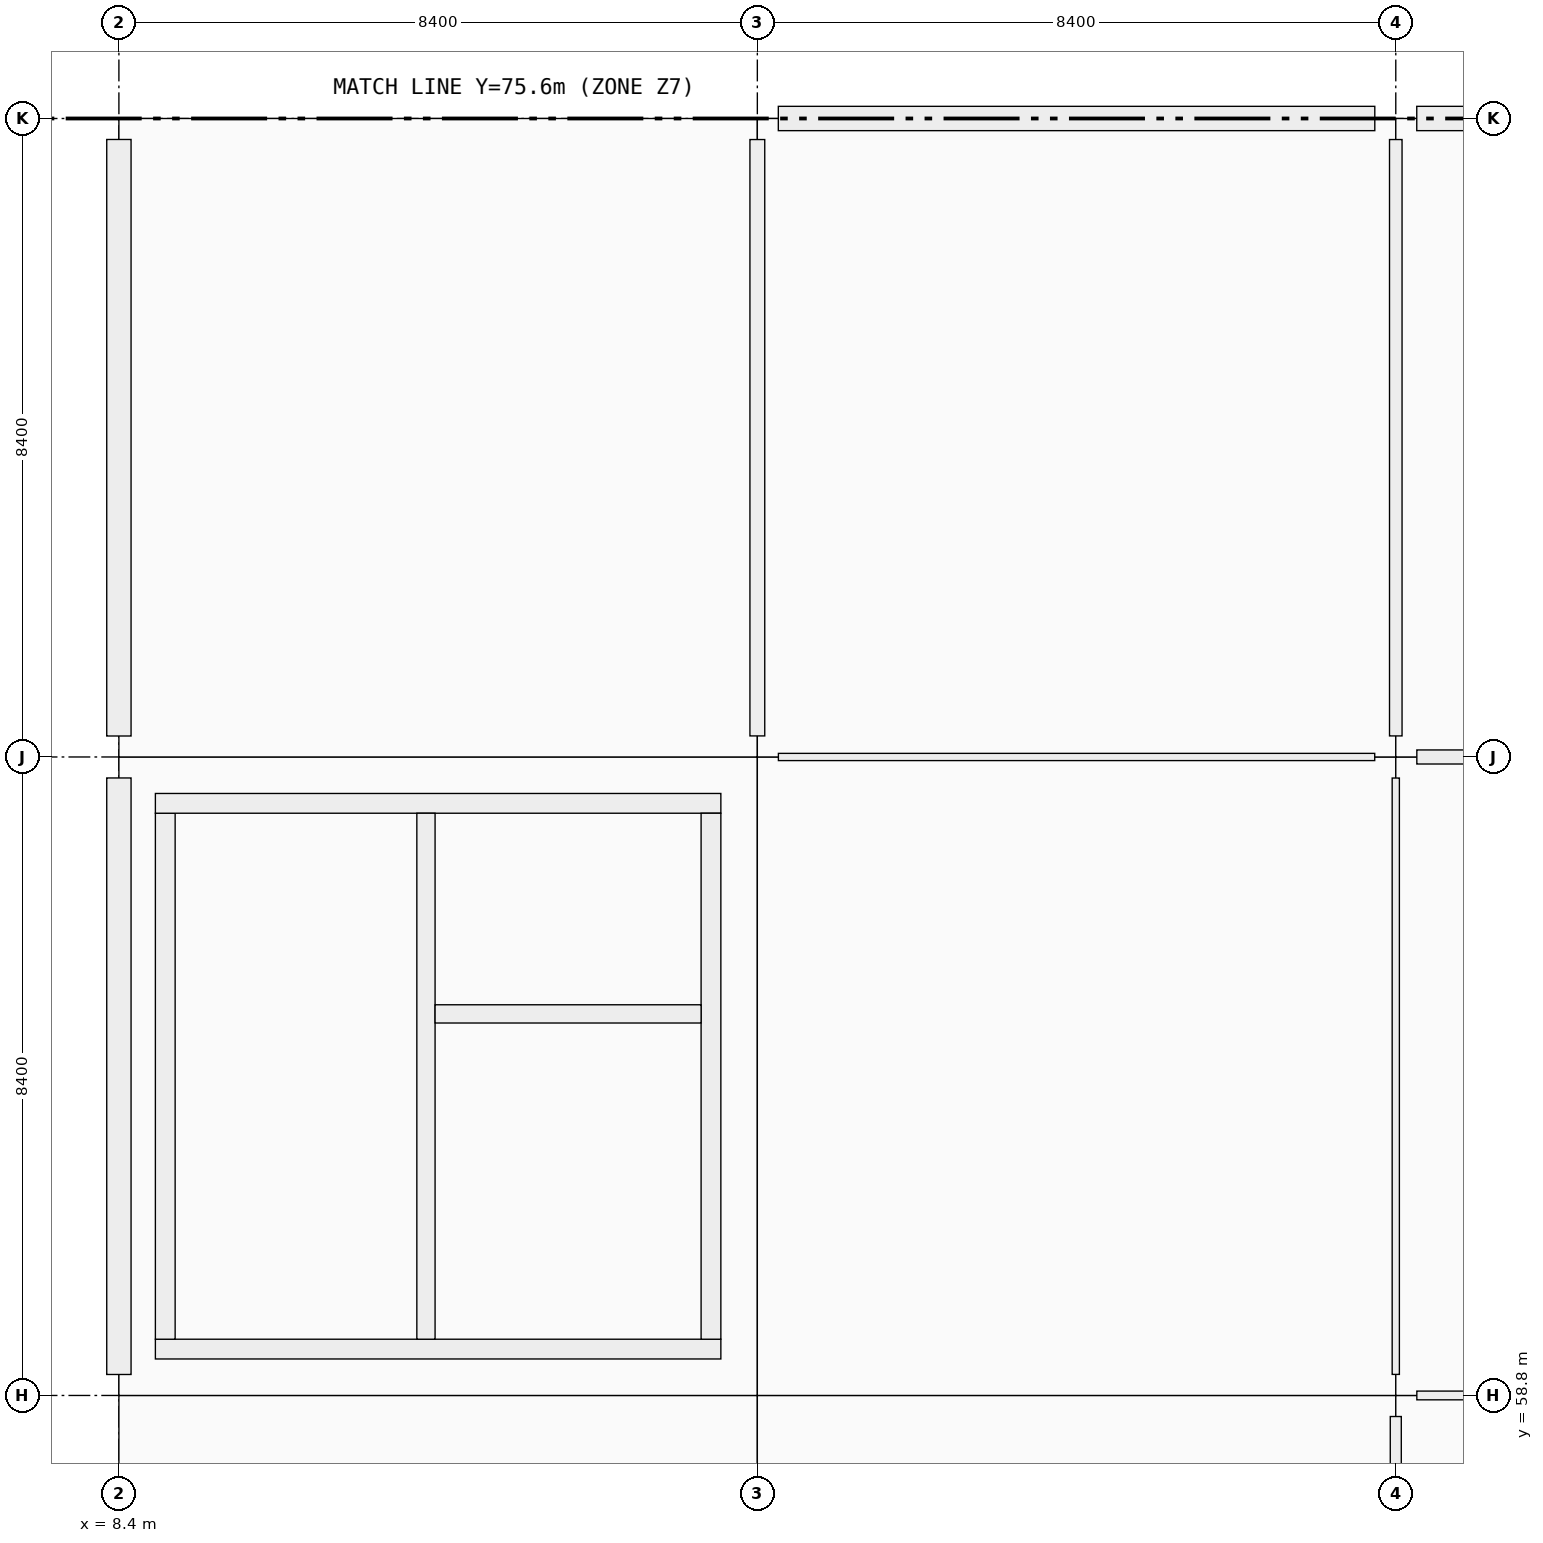
"""IFC4 building model, lengths in metres.
Left out: names, types, materials, properties, quantities, classifications, styles, units other than length and angle.
Written with IfcOpenShell. Run it as: python <this file> out.ifc"""

import sys

from ifc_helpers import new_model, si_unit, direction, frame, frame_2d, origin, origin_2d, place, context, subcontext, project, spatial, rectangle, i_section, extrude, element, fill, save


model = new_model("IFC4")
c1 = context("Model", 3, precision=1e-05, world=origin(), true_north=direction((0.0, 1.0)))
c2 = subcontext(c1, "Body", "Model", "MODEL_VIEW")
j1 = project(units=[si_unit("LENGTHUNIT", "METRE"), si_unit("PLANEANGLEUNIT", "RADIAN")], contexts=[c1])
p1 = place(None, origin())
s1 = spatial("IfcSite", under=j1, at=p1, CompositionType="ELEMENT")
p2 = place(p1, origin())
s2 = spatial("IfcBuilding", under=s1, at=p2, CompositionType="ELEMENT")
p3 = place(p2, frame((0.0, 0.0, 19.08)))
s3 = spatial("IfcBuildingStorey", under=s2, at=p3, CompositionType="ELEMENT", Elevation=19.08)
for number, where, z_axis, x_axis in (
    (1, (8.4, 58.8, 0.0), (0.0, 0.0, 1.0), (1.0, 0.0, 0.0)),
    (2, (8.4, 67.2, 0.0), (0.0, 0.0, 1.0), (1.0, 0.0, 0.0)),
    (3, (8.4, 75.6, 0.0), (0.0, 0.0, 1.0), (1.0, 0.0, 0.0)),
    (4, (16.8, 58.8, 0.0), (0.0, 0.0, 1.0), (1.0, 0.0, 0.0)),
    (5, (16.8, 67.2, 0.0), (0.0, 0.0, 1.0), (1.0, 0.0, 0.0)),
    (6, (16.8, 75.6, 0.0), (0.0, 0.0, 1.0), (1.0, 0.0, 0.0)),
    (7, (25.2, 58.8, 0.0), (0.0, 0.0, 1.0), (1.0, 0.0, 0.0)),
    (8, (25.2, 67.2, 0.0), (0.0, 0.0, 1.0), (1.0, 0.0, 0.0)),
    (9, (25.2, 75.6, 0.0), (0.0, 0.0, 1.0), (1.0, 0.0, 0.0)),
):
    element("IfcColumn", number, at=place(p3, frame(where, z_axis=z_axis, x_axis=x_axis)), inside=s3, PredefinedType="COLUMN", context=c2, shape_type="SweptSolid", body=[
        extrude(rectangle(XDim=0.55, YDim=0.55, at=origin_2d()), origin(), (0.0, 0.0, 1.0), 4.16),
    ])
for number, where, z_axis, x_axis in (
    (10, (16.8, 58.8, 4.16), (0.0, 0.0, 1.0), (1.0, 0.0, 0.0)),
    (11, (25.2, 58.8, 4.16), (0.0, 0.0, 1.0), (1.0, 0.0, 0.0)),
    (12, (16.8, 67.2, 4.16), (0.0, 0.0, 1.0), (1.0, 0.0, 0.0)),
    (13, (25.2, 67.2, 4.16), (0.0, 0.0, 1.0), (1.0, 0.0, 0.0)),
    (14, (16.8, 75.6, 4.16), (0.0, 0.0, 1.0), (1.0, 0.0, 0.0)),
    (15, (25.2, 75.6, 4.16), (0.0, 0.0, 1.0), (1.0, 0.0, 0.0)),
):
    element("IfcColumn", number, at=place(p3, frame(where, z_axis=z_axis, x_axis=x_axis)), inside=s3, PredefinedType="COLUMN", context=c2, shape_type="SweptSolid", body=[
        extrude(i_section(OverallWidth=0.305, OverallDepth=0.308, WebThickness=0.01, FlangeThickness=0.015, FilletRadius=0.017, at=origin_2d()), origin(), (0.0, 0.0, 1.0), 1.925),
    ])
p4 = place(p3, frame((8.4, 59.076, 0.0), z_axis=(0.0, 0.0, 1.0), x_axis=(0.0, 1.0, 0.0)))
e16 = element("IfcWall", 16, at=p4, inside=s3, PredefinedType="SOLIDWALL", context=c2, shape_type="SweptSolid", body=[
    extrude(rectangle(XDim=7.848, YDim=0.32, at=frame_2d((3.924, 0.0))), origin(), (0.0, 0.0, 1.0), 3.37),
])
p5 = place(p3, frame((8.4, 67.476, 0.0), z_axis=(0.0, 0.0, 1.0), x_axis=(0.0, 1.0, 0.0)))
e17 = element("IfcWall", 17, at=p5, inside=s3, PredefinedType="SOLIDWALL", context=c2, shape_type="SweptSolid", body=[
    extrude(rectangle(XDim=7.848, YDim=0.32, at=frame_2d((3.924, 0.0))), origin(), (0.0, 0.0, 1.0), 3.37),
])
p6 = place(p3, frame((17.076, 75.6, 0.0), z_axis=(0.0, 0.0, 1.0), x_axis=(1.0, 0.0, 0.0)))
e18 = element("IfcWall", 18, at=p6, inside=s3, PredefinedType="SOLIDWALL", context=c2, shape_type="SweptSolid", body=[
    extrude(rectangle(XDim=7.848, YDim=0.32, at=frame_2d((3.924, 0.0))), origin(), (0.0, 0.0, 1.0), 3.37),
])
p7 = place(p3, frame((25.476, 75.6, 0.0), z_axis=(0.0, 0.0, 1.0), x_axis=(1.0, 0.0, 0.0)))
e19 = element("IfcWall", 19, at=p7, inside=s3, PredefinedType="SOLIDWALL", context=c2, shape_type="SweptSolid", body=[
    extrude(rectangle(XDim=7.848, YDim=0.32, at=frame_2d((3.924, 0.0))), origin(), (0.0, 0.0, 1.0), 3.37),
])
p8 = place(p7, frame((3.074, 0.0, 0.9)))
e20 = element("IfcOpeningElement", 20, at=p8, cuts=e19, PredefinedType="OPENING", context=c2, shape_type="SweptSolid", body=[
    extrude(rectangle(XDim=1.7, YDim=1.85, at=frame_2d((0.85, 0.925))), frame((0.0, 0.16, 0.0), z_axis=(0.0, -1.0, 0.0), x_axis=(1.0, 0.0, 0.0)), (0.0, 0.0, 1.0), 0.32),
])
p9 = place(p3, frame((16.32, 59.41, 0.0), z_axis=(0.0, 0.0, 1.0), x_axis=(-1.0, 0.0, 0.0)))
e21 = element("IfcWall", 21, at=p9, inside=s3, PredefinedType="SHEAR", context=c2, shape_type="SweptSolid", body=[
    extrude(rectangle(XDim=7.44, YDim=0.26, at=frame_2d((3.72, 0.0))), origin(), (0.0, 0.0, 1.0), 4.07),
])
p10 = place(p9, frame((1.28, 0.0, 0.0)))
e22 = element("IfcOpeningElement", 22, at=p10, cuts=e21, PredefinedType="OPENING", context=c2, shape_type="SweptSolid", body=[
    extrude(rectangle(XDim=1.5, YDim=2.15, at=frame_2d((0.75, 1.075))), frame((0.0, 0.13, 0.0), z_axis=(0.0, -1.0, 0.0), x_axis=(1.0, 0.0, 0.0)), (0.0, 0.0, 1.0), 0.26),
])
p11 = place(p3, frame((9.01, 59.54, 0.0), z_axis=(0.0, 0.0, 1.0), x_axis=(0.0, 1.0, 0.0)))
e23 = element("IfcWall", 23, at=p11, inside=s3, PredefinedType="SHEAR", context=c2, shape_type="SweptSolid", body=[
    extrude(rectangle(XDim=6.92, YDim=0.26, at=frame_2d((3.46, 0.0))), origin(), (0.0, 0.0, 1.0), 4.07),
])
p12 = place(p3, frame((8.88, 66.59, 0.0), z_axis=(0.0, 0.0, 1.0), x_axis=(1.0, 0.0, 0.0)))
e24 = element("IfcWall", 24, at=p12, inside=s3, PredefinedType="SHEAR", context=c2, shape_type="SweptSolid", body=[
    extrude(rectangle(XDim=7.44, YDim=0.26, at=frame_2d((3.72, 0.0))), origin(), (0.0, 0.0, 1.0), 4.07),
])
p13 = place(p3, frame((16.19, 66.46, 0.0), z_axis=(0.0, 0.0, 1.0), x_axis=(0.0, -1.0, 0.0)))
e25 = element("IfcWall", 25, at=p13, inside=s3, PredefinedType="SHEAR", context=c2, shape_type="SweptSolid", body=[
    extrude(rectangle(XDim=6.92, YDim=0.26, at=frame_2d((3.46, 0.0))), origin(), (0.0, 0.0, 1.0), 4.07),
])
p14 = place(p3, frame((12.44, 59.54, 0.0), z_axis=(0.0, 0.0, 1.0), x_axis=(0.0, 1.0, 0.0)))
e26 = element("IfcWall", 26, at=p14, inside=s3, PredefinedType="SHEAR", context=c2, shape_type="SweptSolid", body=[
    extrude(rectangle(XDim=6.92, YDim=0.24, at=frame_2d((3.46, 0.0))), origin(), (0.0, 0.0, 1.0), 4.07),
])
p15 = place(p14, frame((0.12, 0.0, 0.0)))
e27 = element("IfcOpeningElement", 27, at=p15, cuts=e26, PredefinedType="OPENING", context=c2, shape_type="SweptSolid", body=[
    extrude(rectangle(XDim=1.0, YDim=2.15, at=frame_2d((0.5, 1.075))), frame((0.0, 0.12, 0.0), z_axis=(0.0, -1.0, 0.0), x_axis=(1.0, 0.0, 0.0)), (0.0, 0.0, 1.0), 0.24),
])
p16 = place(p3, frame((12.56, 63.82, 0.0), z_axis=(0.0, 0.0, 1.0), x_axis=(1.0, 0.0, 0.0)))
e28 = element("IfcWall", 28, at=p16, inside=s3, PredefinedType="SHEAR", context=c2, shape_type="SweptSolid", body=[
    extrude(rectangle(XDim=3.5, YDim=0.24, at=frame_2d((1.75, 0.0))), origin(), (0.0, 0.0, 1.0), 4.07),
])
p17 = place(p16, frame((1.2, 0.0, 0.0)))
e29 = element("IfcOpeningElement", 29, at=p17, cuts=e28, PredefinedType="OPENING", context=c2, shape_type="SweptSolid", body=[
    extrude(rectangle(XDim=1.1, YDim=2.15, at=frame_2d((0.55, 1.075))), frame((0.0, 0.12, 0.0), z_axis=(0.0, -1.0, 0.0), x_axis=(1.0, 0.0, 0.0)), (0.0, 0.0, 1.0), 0.24),
])
p18 = place(p3, frame((17.077, 67.2, 0.0), z_axis=(0.0, 0.0, 1.0), x_axis=(1.0, 0.0, 0.0)))
e30 = element("IfcWall", 30, at=p18, inside=s3, PredefinedType="PARTITIONING", context=c2, shape_type="SweptSolid", body=[
    extrude(rectangle(XDim=7.846, YDim=0.095, at=frame_2d((3.923, 0.0))), origin(), (0.0, 0.0, 1.0), 3.19),
])
p19 = place(p18, frame((3.458, 0.0, 0.0)))
e31 = element("IfcOpeningElement", 31, at=p19, cuts=e30, PredefinedType="OPENING", context=c2, shape_type="SweptSolid", body=[
    extrude(rectangle(XDim=0.93, YDim=2.12, at=frame_2d((0.465, 1.06))), frame((0.0, 0.047, 0.0), z_axis=(0.0, -1.0, 0.0), x_axis=(1.0, 0.0, 0.0)), (0.0, 0.0, 1.0), 0.095),
])
p20 = place(p3, frame((25.477, 58.8, 0.0), z_axis=(0.0, 0.0, 1.0), x_axis=(1.0, 0.0, 0.0)))
e32 = element("IfcWall", 32, at=p20, inside=s3, PredefinedType="PARTITIONING", context=c2, shape_type="SweptSolid", body=[
    extrude(rectangle(XDim=7.846, YDim=0.115, at=frame_2d((3.923, 0.0))), origin(), (0.0, 0.0, 1.0), 3.19),
])
p21 = place(p20, frame((3.443, 0.0, 0.0)))
e33 = element("IfcOpeningElement", 33, at=p21, cuts=e32, PredefinedType="OPENING", context=c2, shape_type="SweptSolid", body=[
    extrude(rectangle(XDim=0.96, YDim=2.18, at=frame_2d((0.48, 1.09))), frame((0.0, 0.058, 0.0), z_axis=(0.0, -1.0, 0.0), x_axis=(1.0, 0.0, 0.0)), (0.0, 0.0, 1.0), 0.115),
])
p22 = place(p3, frame((25.477, 67.2, 0.0), z_axis=(0.0, 0.0, 1.0), x_axis=(1.0, 0.0, 0.0)))
e34 = element("IfcWall", 34, at=p22, inside=s3, PredefinedType="PARTITIONING", context=c2, shape_type="SweptSolid", body=[
    extrude(rectangle(XDim=7.846, YDim=0.185, at=frame_2d((3.923, 0.0))), origin(), (0.0, 0.0, 1.0), 3.19),
])
p23 = place(p22, frame((3.453, 0.0, 0.0)))
e35 = element("IfcOpeningElement", 35, at=p23, cuts=e34, PredefinedType="OPENING", context=c2, shape_type="SweptSolid", body=[
    extrude(rectangle(XDim=0.94, YDim=2.15, at=frame_2d((0.47, 1.075))), frame((0.0, 0.093, 0.0), z_axis=(0.0, -1.0, 0.0), x_axis=(1.0, 0.0, 0.0)), (0.0, 0.0, 1.0), 0.185),
])
p24 = place(p3, frame((16.8, 67.477, 0.0), z_axis=(0.0, 0.0, 1.0), x_axis=(0.0, 1.0, 0.0)))
e36 = element("IfcWall", 36, at=p24, inside=s3, PredefinedType="PARTITIONING", context=c2, shape_type="SweptSolid", body=[
    extrude(rectangle(XDim=7.846, YDim=0.195, at=frame_2d((3.923, 0.0))), origin(), (0.0, 0.0, 1.0), 3.19),
])
p25 = place(p24, frame((3.403, 0.0, 0.0)))
e37 = element("IfcOpeningElement", 37, at=p25, cuts=e36, PredefinedType="OPENING", context=c2, shape_type="SweptSolid", body=[
    extrude(rectangle(XDim=1.04, YDim=2.2, at=frame_2d((0.52, 1.1))), frame((0.0, 0.098, 0.0), z_axis=(0.0, -1.0, 0.0), x_axis=(1.0, 0.0, 0.0)), (0.0, 0.0, 1.0), 0.195),
])
p26 = place(p3, frame((25.2, 50.677, 0.0), z_axis=(0.0, 0.0, 1.0), x_axis=(0.0, 1.0, 0.0)))
e38 = element("IfcWall", 38, at=p26, inside=s3, PredefinedType="PARTITIONING", context=c2, shape_type="SweptSolid", body=[
    extrude(rectangle(XDim=7.846, YDim=0.145, at=frame_2d((3.923, 0.0))), origin(), (0.0, 0.0, 1.0), 3.19),
])
p27 = place(p26, frame((3.423, 0.0, 0.0)))
e39 = element("IfcOpeningElement", 39, at=p27, cuts=e38, PredefinedType="OPENING", context=c2, shape_type="SweptSolid", body=[
    extrude(rectangle(XDim=1.0, YDim=2.2, at=frame_2d((0.5, 1.1))), frame((0.0, 0.073, 0.0), z_axis=(0.0, -1.0, 0.0), x_axis=(1.0, 0.0, 0.0)), (0.0, 0.0, 1.0), 0.145),
])
p28 = place(p3, frame((25.2, 59.077, 0.0), z_axis=(0.0, 0.0, 1.0), x_axis=(0.0, 1.0, 0.0)))
e40 = element("IfcWall", 40, at=p28, inside=s3, PredefinedType="PARTITIONING", context=c2, shape_type="SweptSolid", body=[
    extrude(rectangle(XDim=7.846, YDim=0.095, at=frame_2d((3.923, 0.0))), origin(), (0.0, 0.0, 1.0), 3.19),
])
p29 = place(p28, frame((3.433, 0.0, 0.0)))
e41 = element("IfcOpeningElement", 41, at=p29, cuts=e40, PredefinedType="OPENING", context=c2, shape_type="SweptSolid", body=[
    extrude(rectangle(XDim=0.98, YDim=2.18, at=frame_2d((0.49, 1.09))), frame((0.0, 0.047, 0.0), z_axis=(0.0, -1.0, 0.0), x_axis=(1.0, 0.0, 0.0)), (0.0, 0.0, 1.0), 0.095),
])
p30 = place(p3, frame((25.2, 67.477, 0.0), z_axis=(0.0, 0.0, 1.0), x_axis=(0.0, 1.0, 0.0)))
e42 = element("IfcWall", 42, at=p30, inside=s3, PredefinedType="PARTITIONING", context=c2, shape_type="SweptSolid", body=[
    extrude(rectangle(XDim=7.846, YDim=0.165, at=frame_2d((3.923, 0.0))), origin(), (0.0, 0.0, 1.0), 3.19),
])
p31 = place(p30, frame((3.438, 0.0, 0.0)))
e43 = element("IfcOpeningElement", 43, at=p31, cuts=e42, PredefinedType="OPENING", context=c2, shape_type="SweptSolid", body=[
    extrude(rectangle(XDim=0.97, YDim=2.12, at=frame_2d((0.485, 1.06))), frame((0.0, 0.083, 0.0), z_axis=(0.0, -1.0, 0.0), x_axis=(1.0, 0.0, 0.0)), (0.0, 0.0, 1.0), 0.165),
])
p32 = place(p15, origin())
e44 = element("IfcDoor", 44, at=p32, inside=s3, OperationType="SINGLE_SWING_LEFT", PredefinedType="DOOR", context=c2, shape_type="SweptSolid", body=[
    extrude(rectangle(XDim=1.0, YDim=2.15, at=frame_2d((0.5, 1.075))), frame((0.0, 0.025, 0.0), z_axis=(0.0, -1.0, 0.0), x_axis=(1.0, 0.0, 0.0)), (0.0, 0.0, 1.0), 0.05),
])
fill(e27, e44)
p33 = place(p10, origin())
e45 = element("IfcDoor", 45, at=p33, inside=s3, OperationType="DOUBLE_DOOR_SINGLE_SWING", PredefinedType="DOOR", context=c2, shape_type="SweptSolid", body=[
    extrude(rectangle(XDim=1.5, YDim=2.15, at=frame_2d((0.75, 1.075))), frame((0.0, 0.025, 0.0), z_axis=(0.0, -1.0, 0.0), x_axis=(1.0, 0.0, 0.0)), (0.0, 0.0, 1.0), 0.05),
])
fill(e22, e45)
p34 = place(p17, origin())
e46 = element("IfcDoor", 46, at=p34, inside=s3, OperationType="DOUBLE_DOOR_SLIDING", PredefinedType="DOOR", context=c2, shape_type="SweptSolid", body=[
    extrude(rectangle(XDim=1.1, YDim=2.15, at=frame_2d((0.55, 1.075))), frame((0.0, 0.025, 0.0), z_axis=(0.0, -1.0, 0.0), x_axis=(1.0, 0.0, 0.0)), (0.0, 0.0, 1.0), 0.05),
])
fill(e29, e46)
p35 = place(p19, origin())
e47 = element("IfcDoor", 47, at=p35, inside=s3, OperationType="SINGLE_SWING_LEFT", PredefinedType="DOOR", context=c2, shape_type="SweptSolid", body=[
    extrude(rectangle(XDim=0.93, YDim=2.12, at=frame_2d((0.465, 1.06))), frame((0.0, 0.025, 0.0), z_axis=(0.0, -1.0, 0.0), x_axis=(1.0, 0.0, 0.0)), (0.0, 0.0, 1.0), 0.05),
])
fill(e31, e47)
p36 = place(p29, origin())
e48 = element("IfcDoor", 48, at=p36, inside=s3, OperationType="SINGLE_SWING_LEFT", PredefinedType="DOOR", context=c2, shape_type="SweptSolid", body=[
    extrude(rectangle(XDim=0.98, YDim=2.18, at=frame_2d((0.49, 1.09))), frame((0.0, 0.025, 0.0), z_axis=(0.0, -1.0, 0.0), x_axis=(1.0, 0.0, 0.0)), (0.0, 0.0, 1.0), 0.05),
])
fill(e41, e48)
p37 = place(p25, origin())
e49 = element("IfcDoor", 49, at=p37, inside=s3, OperationType="SINGLE_SWING_LEFT", PredefinedType="DOOR", context=c2, shape_type="SweptSolid", body=[
    extrude(rectangle(XDim=1.04, YDim=2.2, at=frame_2d((0.52, 1.1))), frame((0.0, 0.025, 0.0), z_axis=(0.0, -1.0, 0.0), x_axis=(1.0, 0.0, 0.0)), (0.0, 0.0, 1.0), 0.05),
])
fill(e37, e49)
p38 = place(p31, origin())
e50 = element("IfcDoor", 50, at=p38, inside=s3, OperationType="SINGLE_SWING_RIGHT", PredefinedType="DOOR", context=c2, shape_type="SweptSolid", body=[
    extrude(rectangle(XDim=0.97, YDim=2.12, at=frame_2d((0.485, 1.06))), frame((0.0, 0.025, 0.0), z_axis=(0.0, -1.0, 0.0), x_axis=(1.0, 0.0, 0.0)), (0.0, 0.0, 1.0), 0.05),
])
fill(e43, e50)
save(model, sys.argv[1])
